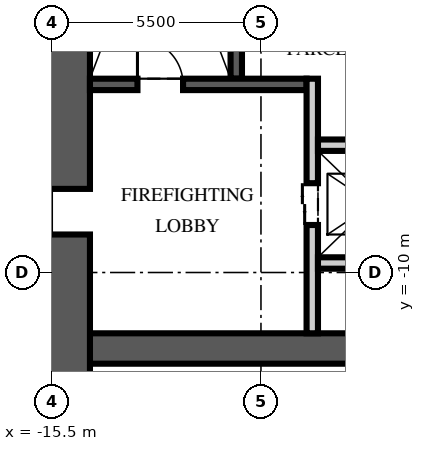
"""IFC4 building model, lengths in metres.
Left out: names, types, materials, properties, quantities, classifications, styles, units other than length and angle.
Written with IfcOpenShell. Run it as: python <this file> out.ifc"""

import sys

from ifc_helpers import new_model, si_unit, direction, frame, frame_2d, origin, place, context, subcontext, project, spatial, rectangle, extrude, element, fill, save


model = new_model("IFC4")
c1 = context("Model", 3, precision=1e-05, world=origin(), true_north=direction((0.0, 1.0)))
c2 = subcontext(c1, "Body", "Model", "MODEL_VIEW")
j1 = project(units=[si_unit("LENGTHUNIT", "METRE"), si_unit("PLANEANGLEUNIT", "RADIAN")], contexts=[c1])
p1 = place(None, origin())
s1 = spatial("IfcSite", under=j1, at=p1, CompositionType="ELEMENT")
p2 = place(p1, origin())
s2 = spatial("IfcBuilding", under=s1, at=p2, CompositionType="ELEMENT")
p3 = place(p2, frame((0.0, 0.0, 66.0)))
s3 = spatial("IfcBuildingStorey", under=s2, at=p3, CompositionType="ELEMENT", Elevation=66.0)
p4 = place(p3, frame((-15.5, -12.0, -0.25), z_axis=(0.0, 0.0, 1.0), x_axis=(1.0, 0.0, 0.0)))
e1 = element("IfcWall", 1, at=p4, inside=s3, PredefinedType="SHEAR", context=c2, shape_type="SweptSolid", body=[
    extrude(rectangle(XDim=31.0, YDim=0.8, at=frame_2d((15.5, 0.0))), origin(), (0.0, 0.0, 1.0), 3.75),
])
p5 = place(p3, frame((-15.5, -15.5, -0.25), z_axis=(0.0, 0.0, 1.0), x_axis=(0.0, 1.0, 0.0)))
e2 = element("IfcWall", 2, at=p5, inside=s3, PredefinedType="SHEAR", context=c2, shape_type="SweptSolid", body=[
    extrude(rectangle(XDim=31.0, YDim=2.0, at=frame_2d((15.5, 0.0))), origin(), (0.0, 0.0, 1.0), 3.75),
])
p6 = place(p5, frame((6.5, 0.0, 0.25)))
e3 = element("IfcOpeningElement", 3, at=p6, cuts=e2, PredefinedType="OPENING", context=c2, shape_type="SweptSolid", body=[
    extrude(rectangle(XDim=1.2, YDim=2.1, at=frame_2d((0.6, 1.05))), frame((0.0, 1.01, 0.0), z_axis=(0.0, -1.0, 0.0), x_axis=(1.0, 0.0, 0.0)), (0.0, 0.0, 1.0), 2.02),
])
p7 = place(p5, frame((23.0, 0.0, 0.25)))
e4 = element("IfcOpeningElement", 4, at=p7, cuts=e2, PredefinedType="OPENING", context=c2, shape_type="SweptSolid", body=[
    extrude(rectangle(XDim=1.8, YDim=2.1, at=frame_2d((0.9, 1.05))), frame((0.0, 1.01, 0.0), z_axis=(0.0, -1.0, 0.0), x_axis=(1.0, 0.0, 0.0)), (0.0, 0.0, 1.0), 2.02),
])
p8 = place(p3, frame((-10.65, -4.9, 0.0), z_axis=(0.0, 0.0, 1.0), x_axis=(0.0, 1.0, 0.0)))
e5 = element("IfcWall", 5, at=p8, inside=s3, PredefinedType="SOLIDWALL", context=c2, shape_type="SweptSolid", body=[
    extrude(rectangle(XDim=10.1, YDim=0.3, at=frame_2d((5.05, 0.0))), origin(), (0.0, 0.0, 1.0), 3.5),
])
p9 = place(p3, frame((-14.5, -5.05, 0.0), z_axis=(0.0, 0.0, 1.0), x_axis=(1.0, 0.0, 0.0)))
e6 = element("IfcWall", 6, at=p9, inside=s3, PredefinedType="SOLIDWALL", context=c2, shape_type="SweptSolid", body=[
    extrude(rectangle(XDim=5.7, YDim=0.3, at=frame_2d((2.85, 0.0))), origin(), (0.0, 0.0, 1.0), 3.5),
])
p10 = place(p9, frame((1.25, 0.0, 0.0)))
e7 = element("IfcOpeningElement", 7, at=p10, cuts=e6, PredefinedType="OPENING", context=c2, shape_type="SweptSolid", body=[
    extrude(rectangle(XDim=1.2, YDim=2.1, at=frame_2d((0.6, 1.05))), frame((0.0, 0.16, 0.0), z_axis=(0.0, -1.0, 0.0), x_axis=(1.0, 0.0, 0.0)), (0.0, 0.0, 1.0), 0.32),
])
p11 = place(p3, frame((-8.65, -11.6, 0.0), z_axis=(0.0, 0.0, 1.0), x_axis=(0.0, 1.0, 0.0)))
e8 = element("IfcWall", 8, at=p11, inside=s3, PredefinedType="PARTITIONING", context=c2, shape_type="SweptSolid", body=[
    extrude(rectangle(XDim=6.7, YDim=0.3, at=frame_2d((3.35, 0.0))), origin(), (0.0, 0.0, 1.0), 3.5),
])
p12 = place(p11, frame((2.85, 0.0, 0.0)))
e9 = element("IfcOpeningElement", 9, at=p12, cuts=e8, PredefinedType="OPENING", context=c2, shape_type="SweptSolid", body=[
    extrude(rectangle(XDim=1.1, YDim=2.1, at=frame_2d((0.55, 1.05))), frame((0.0, 0.16, 0.0), z_axis=(0.0, -1.0, 0.0), x_axis=(1.0, 0.0, 0.0)), (0.0, 0.0, 1.0), 0.32),
])
p13 = place(p3, frame((-8.5, -6.65, 0.0), z_axis=(0.0, 0.0, 1.0), x_axis=(1.0, 0.0, 0.0)))
e10 = element("IfcWall", 10, at=p13, inside=s3, PredefinedType="PARTITIONING", context=c2, shape_type="SweptSolid", body=[
    extrude(rectangle(XDim=17.0, YDim=0.3, at=frame_2d((8.5, 0.0))), origin(), (0.0, 0.0, 1.0), 3.5),
])
p14 = place(p13, frame((7.8, 0.0, 0.0)))
e11 = element("IfcOpeningElement", 11, at=p14, cuts=e10, PredefinedType="OPENING", context=c2, shape_type="SweptSolid", body=[
    extrude(rectangle(XDim=1.3, YDim=2.4, at=frame_2d((0.65, 1.2))), frame((0.0, 0.16, 0.0), z_axis=(0.0, -1.0, 0.0), x_axis=(1.0, 0.0, 0.0)), (0.0, 0.0, 1.0), 0.32),
])
p15 = place(p13, frame((5.65, 0.0, 0.0)))
e12 = element("IfcOpeningElement", 12, at=p15, cuts=e10, PredefinedType="OPENING", context=c2, shape_type="SweptSolid", body=[
    extrude(rectangle(XDim=0.9, YDim=2.1, at=frame_2d((0.45, 1.05))), frame((0.0, 0.16, 0.0), z_axis=(0.0, -1.0, 0.0), x_axis=(1.0, 0.0, 0.0)), (0.0, 0.0, 1.0), 0.32),
])
p16 = place(p13, frame((10.4, 0.0, 0.0)))
e13 = element("IfcOpeningElement", 13, at=p16, cuts=e10, PredefinedType="OPENING", context=c2, shape_type="SweptSolid", body=[
    extrude(rectangle(XDim=0.9, YDim=2.1, at=frame_2d((0.45, 1.05))), frame((0.0, 0.16, 0.0), z_axis=(0.0, -1.0, 0.0), x_axis=(1.0, 0.0, 0.0)), (0.0, 0.0, 1.0), 0.32),
])
p17 = place(p3, frame((-8.5, -9.75, 0.0), z_axis=(0.0, 0.0, 1.0), x_axis=(1.0, 0.0, 0.0)))
e14 = element("IfcWall", 14, at=p17, inside=s3, PredefinedType="PARTITIONING", context=c2, shape_type="SweptSolid", body=[
    extrude(rectangle(XDim=2.9, YDim=0.3, at=frame_2d((1.45, 0.0))), origin(), (0.0, 0.0, 1.0), 3.5),
])
p18 = place(p10, origin())
e15 = element("IfcDoor", 15, at=p18, inside=s3, OperationType="SINGLE_SWING_LEFT", PredefinedType="DOOR", context=c2, shape_type="SweptSolid", body=[
    extrude(rectangle(XDim=1.2, YDim=2.1, at=frame_2d((0.6, 1.05))), frame((0.0, 0.025, 0.0), z_axis=(0.0, -1.0, 0.0), x_axis=(1.0, 0.0, 0.0)), (0.0, 0.0, 1.0), 0.05),
])
fill(e7, e15)
p19 = place(p6, origin())
e16 = element("IfcDoor", 16, at=p19, inside=s3, OperationType="SINGLE_SWING_LEFT", PredefinedType="DOOR", context=c2, shape_type="SweptSolid", body=[
    extrude(rectangle(XDim=1.2, YDim=2.1, at=frame_2d((0.6, 1.05))), frame((0.0, 0.025, 0.0), z_axis=(0.0, -1.0, 0.0), x_axis=(1.0, 0.0, 0.0)), (0.0, 0.0, 1.0), 0.05),
])
fill(e3, e16)
p20 = place(p12, origin())
e17 = element("IfcDoor", 17, at=p20, inside=s3, OperationType="DOUBLE_DOOR_SLIDING", PredefinedType="DOOR", context=c2, shape_type="SweptSolid", body=[
    extrude(rectangle(XDim=1.1, YDim=2.1, at=frame_2d((0.55, 1.05))), frame((0.0, 0.025, 0.0), z_axis=(0.0, -1.0, 0.0), x_axis=(1.0, 0.0, 0.0)), (0.0, 0.0, 1.0), 0.05),
])
fill(e9, e17)
save(model, sys.argv[1])
